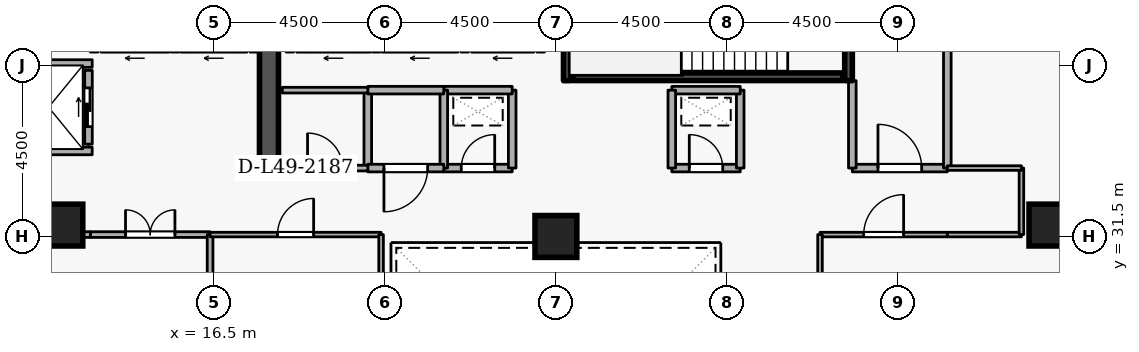
"""IFC4 building model, lengths in metres.
Left out: names, types, materials, properties, quantities, classifications, styles, units other than length and angle.
Written with IfcOpenShell. Run it as: python <this file> out.ifc"""

import sys

from ifc_helpers import new_model, si_unit, direction, frame, frame_2d, origin, origin_2d, place, context, subcontext, project, spatial, rectangle, extrude, element, fill, save


model = new_model("IFC4")
c1 = context("Model", 3, precision=1e-05, world=origin(), true_north=direction((0.0, 1.0)))
c2 = subcontext(c1, "Body", "Model", "MODEL_VIEW")
j1 = project(units=[si_unit("LENGTHUNIT", "METRE"), si_unit("PLANEANGLEUNIT", "RADIAN")], contexts=[c1])
p1 = place(None, origin())
s1 = spatial("IfcSite", under=j1, at=p1, CompositionType="ELEMENT")
p2 = place(p1, origin())
s2 = spatial("IfcBuilding", under=s1, at=p2, CompositionType="ELEMENT")
p3 = place(p2, frame((0.0, 0.0, 185.7)))
s3 = spatial("IfcBuildingStorey", under=s2, at=p3, CompositionType="ELEMENT", Elevation=185.7)
p4 = place(p3, frame((17.95, 33.1, 0.0), z_axis=(0.0, 0.0, 1.0), x_axis=(0.0, 1.0, 0.0)))
e1 = element("IfcWall", 1, at=p4, inside=s3, PredefinedType="SHEAR", context=c2, shape_type="SweptSolid", body=[
    extrude(rectangle(XDim=5.8, YDim=0.5, at=frame_2d((2.9, 0.0))), origin(), (0.0, 0.0, 1.0), 3.6),
])
for number, where, z_axis, x_axis in (
    (2, (12.5, 31.8, 0.0), (0.0, 0.0, 1.0), (1.0, 0.0, 0.0)),
    (3, (38.5, 31.8, 0.0), (0.0, 0.0, 1.0), (1.0, 0.0, 0.0)),
    (4, (25.5, 31.5, 0.0), (0.0, 0.0, 1.0), (1.0, 0.0, 0.0)),
):
    element("IfcColumn", number, at=place(p3, frame(where, z_axis=z_axis, x_axis=x_axis)), inside=s3, PredefinedType="COLUMN", context=c2, shape_type="SweptSolid", body=[
        extrude(rectangle(XDim=1.1, YDim=1.1, at=origin_2d()), origin(), (0.0, 0.0, 1.0), 3.6),
    ])
p5 = place(p3, frame((24.92, 36.45, 0.0), z_axis=(0.0, 0.0, 1.0), x_axis=(-1.0, 0.0, 0.0)))
e5 = element("IfcWall", 5, at=p5, inside=s3, PredefinedType="STANDARD", context=c2, shape_type="SweptSolid", body=[
    extrude(rectangle(XDim=1.64, YDim=0.2, at=frame_2d((0.82, 0.0))), origin(), (0.0, 0.0, 1.0), 3.34),
])
p6 = place(p5, frame((0.31, 0.0, 0.0)))
e6 = element("IfcOpeningElement", 6, at=p6, cuts=e5, PredefinedType="OPENING", context=c2, shape_type="SweptSolid", body=[
    extrude(rectangle(XDim=1.02, YDim=2.06, at=frame_2d((0.51, 1.03))), frame((0.0, 0.11, 0.0), z_axis=(0.0, -1.0, 0.0), x_axis=(1.0, 0.0, 0.0)), (0.0, 0.0, 1.0), 0.22),
])
p7 = place(p3, frame((22.92, 36.45, 0.0), z_axis=(0.0, 0.0, 1.0), x_axis=(-1.0, 0.0, 0.0)))
e7 = element("IfcWall", 7, at=p7, inside=s3, PredefinedType="STANDARD", context=c2, shape_type="SweptSolid", body=[
    extrude(rectangle(XDim=1.99, YDim=0.2, at=frame_2d((0.995, 0.0))), origin(), (0.0, 0.0, 1.0), 3.34),
])
p8 = place(p7, frame((0.485, 0.0, 0.0)))
e8 = element("IfcOpeningElement", 8, at=p8, cuts=e7, PredefinedType="OPENING", context=c2, shape_type="SweptSolid", body=[
    extrude(rectangle(XDim=1.02, YDim=2.06, at=frame_2d((0.51, 1.03))), frame((0.0, 0.11, 0.0), z_axis=(0.0, -1.0, 0.0), x_axis=(1.0, 0.0, 0.0)), (0.0, 0.0, 1.0), 0.22),
])
p9 = place(p3, frame((20.62, 36.45, 0.0), z_axis=(0.0, 0.0, 1.0), x_axis=(-1.0, 0.0, 0.0)))
e9 = element("IfcWall", 9, at=p9, inside=s3, PredefinedType="STANDARD", context=c2, shape_type="SweptSolid", body=[
    extrude(rectangle(XDim=1.94, YDim=0.2, at=frame_2d((0.97, 0.0))), origin(), (0.0, 0.0, 1.0), 3.34),
])
p10 = place(p9, frame((0.46, 0.0, 0.0)))
e10 = element("IfcOpeningElement", 10, at=p10, cuts=e9, PredefinedType="OPENING", context=c2, shape_type="SweptSolid", body=[
    extrude(rectangle(XDim=1.02, YDim=2.06, at=frame_2d((0.51, 1.03))), frame((0.0, 0.11, 0.0), z_axis=(0.0, -1.0, 0.0), x_axis=(1.0, 0.0, 0.0)), (0.0, 0.0, 1.0), 0.22),
])
p11 = place(p3, frame((17.37, 36.45, 0.0), z_axis=(0.0, 0.0, 1.0), x_axis=(-1.0, 0.0, 0.0)))
e11 = element("IfcWall", 11, at=p11, inside=s3, PredefinedType="STANDARD", context=c2, shape_type="SweptSolid", body=[
    extrude(rectangle(XDim=1.74, YDim=0.2, at=frame_2d((0.87, 0.0))), origin(), (0.0, 0.0, 1.0), 3.34),
])
p12 = place(p11, frame((0.36, 0.0, 0.0)))
e12 = element("IfcOpeningElement", 12, at=p12, cuts=e11, PredefinedType="OPENING", context=c2, shape_type="SweptSolid", body=[
    extrude(rectangle(XDim=1.02, YDim=2.06, at=frame_2d((0.51, 1.03))), frame((0.0, 0.11, 0.0), z_axis=(0.0, -1.0, 0.0), x_axis=(1.0, 0.0, 0.0)), (0.0, 0.0, 1.0), 0.22),
])
p13 = place(p3, frame((15.32, 36.45, 0.0), z_axis=(0.0, 0.0, 1.0), x_axis=(-1.0, 0.0, 0.0)))
e13 = element("IfcWall", 13, at=p13, inside=s3, PredefinedType="STANDARD", context=c2, shape_type="SweptSolid", body=[
    extrude(rectangle(XDim=1.79, YDim=0.2, at=frame_2d((0.895, 0.0))), origin(), (0.0, 0.0, 1.0), 3.34),
])
p14 = place(p13, frame((0.385, 0.0, 0.0)))
e14 = element("IfcOpeningElement", 14, at=p14, cuts=e13, PredefinedType="OPENING", context=c2, shape_type="SweptSolid", body=[
    extrude(rectangle(XDim=1.02, YDim=2.06, at=frame_2d((0.51, 1.03))), frame((0.0, 0.11, 0.0), z_axis=(0.0, -1.0, 0.0), x_axis=(1.0, 0.0, 0.0)), (0.0, 0.0, 1.0), 0.22),
])
p15 = place(p3, frame((13.2, 33.93, 0.0), z_axis=(0.0, 0.0, 1.0), x_axis=(0.0, 1.0, 0.0)))
e15 = element("IfcWall", 15, at=p15, inside=s3, PredefinedType="STANDARD", context=c2, shape_type="SweptSolid", body=[
    extrude(rectangle(XDim=1.94, YDim=0.2, at=frame_2d((0.97, 0.0))), origin(), (0.0, 0.0, 1.0), 3.34),
])
p16 = place(p15, frame((0.46, 0.0, 0.0)))
e16 = element("IfcOpeningElement", 16, at=p16, cuts=e15, PredefinedType="OPENING", context=c2, shape_type="SweptSolid", body=[
    extrude(rectangle(XDim=1.02, YDim=2.06, at=frame_2d((0.51, 1.03))), frame((0.0, 0.11, 0.0), z_axis=(0.0, -1.0, 0.0), x_axis=(1.0, 0.0, 0.0)), (0.0, 0.0, 1.0), 0.22),
])
for number, where, z_axis, x_axis in (
    (17, (11.002, 36.05, 0.0), (0.0, 0.0, 1.0), (1.0, 0.0, 0.0)),
    (18, (11.002, 33.75, 0.0), (0.0, 0.0, 1.0), (1.0, 0.0, 0.0)),
):
    element("IfcWall", number, at=place(p3, frame(where, z_axis=z_axis, x_axis=x_axis)), inside=s3, PredefinedType="STANDARD", context=c2, shape_type="SweptSolid", body=[
        extrude(rectangle(XDim=2.296, YDim=0.2, at=frame_2d((1.148, 0.0))), origin(), (0.0, 0.0, 1.0), 3.34),
    ])
p17 = place(p3, frame((33.2, 38.95, 0.0), z_axis=(0.0, 0.0, 1.0), x_axis=(0.0, -1.0, 0.0)))
e19 = element("IfcWall", 19, at=p17, inside=s3, PredefinedType="SHEAR", context=c2, shape_type="SweptSolid", body=[
    extrude(rectangle(XDim=3.35, YDim=0.2, at=frame_2d((1.675, 0.0))), origin(), (0.0, 0.0, 1.0), 3.6),
])
p18 = place(p17, frame((1.125, 0.0, 0.0)))
e20 = element("IfcOpeningElement", 20, at=p18, cuts=e19, PredefinedType="OPENING", context=c2, shape_type="SweptSolid", body=[
    extrude(rectangle(XDim=1.1, YDim=2.1, at=frame_2d((0.55, 1.05))), frame((0.0, 0.11, 0.0), z_axis=(0.0, -1.0, 0.0), x_axis=(1.0, 0.0, 0.0)), (0.0, 0.0, 1.0), 0.22),
])
p19 = place(p3, frame((25.8, 35.6, 0.0), z_axis=(0.0, 0.0, 1.0), x_axis=(0.0, 1.0, 0.0)))
e21 = element("IfcWall", 21, at=p19, inside=s3, PredefinedType="SHEAR", context=c2, shape_type="SweptSolid", body=[
    extrude(rectangle(XDim=3.35, YDim=0.2, at=frame_2d((1.675, 0.0))), origin(), (0.0, 0.0, 1.0), 3.6),
])
p20 = place(p3, frame((25.95, 35.703, 0.0), z_axis=(0.0, 0.0, 1.0), x_axis=(1.0, 0.0, 0.0)))
e22 = element("IfcWall", 22, at=p20, inside=s3, PredefinedType="SHEAR", context=c2, shape_type="SweptSolid", body=[
    extrude(rectangle(XDim=7.1, YDim=0.2, at=frame_2d((3.55, 0.0))), origin(), (0.0, 0.0, 1.0), 3.6),
])
p21 = place(p3, frame((33.3, 33.3, 0.0), z_axis=(0.0, 0.0, 1.0), x_axis=(1.0, 0.0, 0.0)))
e23 = element("IfcWall", 23, at=p21, inside=s3, PredefinedType="STANDARD", context=c2, shape_type="SweptSolid", body=[
    extrude(rectangle(XDim=2.5, YDim=0.2, at=frame_2d((1.25, 0.0))), origin(), (0.0, 0.0, 1.0), 3.34),
])
p22 = place(p21, frame((0.675, 0.0, 0.0)))
e24 = element("IfcOpeningElement", 24, at=p22, cuts=e23, PredefinedType="OPENING", context=c2, shape_type="SweptSolid", body=[
    extrude(rectangle(XDim=1.15, YDim=2.1, at=frame_2d((0.575, 1.05))), frame((0.0, 0.11, 0.0), z_axis=(0.0, -1.0, 0.0), x_axis=(1.0, 0.0, 0.0)), (0.0, 0.0, 1.0), 0.22),
])
p23 = place(p3, frame((35.8, 33.3, 0.0), z_axis=(0.0, 0.0, 1.0), x_axis=(0.0, 1.0, 0.0)))
e25 = element("IfcWall", 25, at=p23, inside=s3, PredefinedType="STANDARD", context=c2, shape_type="SweptSolid", body=[
    extrude(rectangle(XDim=5.7, YDim=0.2, at=frame_2d((2.85, 0.0))), origin(), (0.0, 0.0, 1.0), 3.34),
])
p24 = place(p3, frame((33.3, 35.6, 0.0), z_axis=(0.0, 0.0, 1.0), x_axis=(0.0, -1.0, 0.0)))
e26 = element("IfcWall", 26, at=p24, inside=s3, PredefinedType="STANDARD", context=c2, shape_type="SweptSolid", body=[
    extrude(rectangle(XDim=2.3, YDim=0.2, at=frame_2d((1.15, 0.0))), origin(), (0.0, 0.0, 1.0), 2.545),
])
p25 = place(p3, frame((22.55, 33.3, 0.0), z_axis=(0.0, 0.0, 1.0), x_axis=(1.0, 0.0, 0.0)))
e27 = element("IfcWall", 27, at=p25, inside=s3, PredefinedType="STANDARD", context=c2, shape_type="SweptSolid", body=[
    extrude(rectangle(XDim=1.8, YDim=0.2, at=frame_2d((0.9, 0.0))), origin(), (0.0, 0.0, 1.0), 3.34),
])
p26 = place(p25, frame((0.46, 0.0, 0.0)))
e28 = element("IfcOpeningElement", 28, at=p26, cuts=e27, PredefinedType="OPENING", context=c2, shape_type="SweptSolid", body=[
    extrude(rectangle(XDim=0.88, YDim=2.04, at=frame_2d((0.44, 1.02))), frame((0.0, 0.11, 0.0), z_axis=(0.0, -1.0, 0.0), x_axis=(1.0, 0.0, 0.0)), (0.0, 0.0, 1.0), 0.22),
])
p27 = place(p3, frame((24.35, 33.3, 0.0), z_axis=(0.0, 0.0, 1.0), x_axis=(0.0, 1.0, 0.0)))
e29 = element("IfcWall", 29, at=p27, inside=s3, PredefinedType="STANDARD", context=c2, shape_type="SweptSolid", body=[
    extrude(rectangle(XDim=2.05, YDim=0.2, at=frame_2d((1.025, 0.0))), origin(), (0.0, 0.0, 1.0), 3.34),
])
p28 = place(p3, frame((24.35, 35.35, 0.0), z_axis=(0.0, 0.0, 1.0), x_axis=(-1.0, 0.0, 0.0)))
e30 = element("IfcWall", 30, at=p28, inside=s3, PredefinedType="STANDARD", context=c2, shape_type="SweptSolid", body=[
    extrude(rectangle(XDim=1.8, YDim=0.2, at=frame_2d((0.9, 0.0))), origin(), (0.0, 0.0, 1.0), 3.34),
])
p29 = place(p3, frame((22.55, 35.35, 0.0), z_axis=(0.0, 0.0, 1.0), x_axis=(0.0, -1.0, 0.0)))
e31 = element("IfcWall", 31, at=p29, inside=s3, PredefinedType="STANDARD", context=c2, shape_type="SweptSolid", body=[
    extrude(rectangle(XDim=2.05, YDim=0.2, at=frame_2d((1.025, 0.0))), origin(), (0.0, 0.0, 1.0), 3.34),
])
p30 = place(p3, frame((28.55, 33.3, 0.0), z_axis=(0.0, 0.0, 1.0), x_axis=(1.0, 0.0, 0.0)))
e32 = element("IfcWall", 32, at=p30, inside=s3, PredefinedType="STANDARD", context=c2, shape_type="SweptSolid", body=[
    extrude(rectangle(XDim=1.8, YDim=0.2, at=frame_2d((0.9, 0.0))), origin(), (0.0, 0.0, 1.0), 3.34),
])
p31 = place(p30, frame((0.46, 0.0, 0.0)))
e33 = element("IfcOpeningElement", 33, at=p31, cuts=e32, PredefinedType="OPENING", context=c2, shape_type="SweptSolid", body=[
    extrude(rectangle(XDim=0.88, YDim=2.04, at=frame_2d((0.44, 1.02))), frame((0.0, 0.11, 0.0), z_axis=(0.0, -1.0, 0.0), x_axis=(1.0, 0.0, 0.0)), (0.0, 0.0, 1.0), 0.22),
])
p32 = place(p3, frame((30.35, 33.3, 0.0), z_axis=(0.0, 0.0, 1.0), x_axis=(0.0, 1.0, 0.0)))
e34 = element("IfcWall", 34, at=p32, inside=s3, PredefinedType="STANDARD", context=c2, shape_type="SweptSolid", body=[
    extrude(rectangle(XDim=2.05, YDim=0.2, at=frame_2d((1.025, 0.0))), origin(), (0.0, 0.0, 1.0), 3.34),
])
p33 = place(p3, frame((30.35, 35.35, 0.0), z_axis=(0.0, 0.0, 1.0), x_axis=(-1.0, 0.0, 0.0)))
e35 = element("IfcWall", 35, at=p33, inside=s3, PredefinedType="STANDARD", context=c2, shape_type="SweptSolid", body=[
    extrude(rectangle(XDim=1.8, YDim=0.2, at=frame_2d((0.9, 0.0))), origin(), (0.0, 0.0, 1.0), 3.34),
])
for number, where, z_axis, x_axis in (
    (36, (28.55, 35.35, 0.0), (0.0, 0.0, 1.0), (0.0, -1.0, 0.0)),
    (37, (20.55, 33.3, 0.0), (0.0, 0.0, 1.0), (0.0, 1.0, 0.0)),
):
    element("IfcWall", number, at=place(p3, frame(where, z_axis=z_axis, x_axis=x_axis)), inside=s3, PredefinedType="STANDARD", context=c2, shape_type="SweptSolid", body=[
        extrude(rectangle(XDim=2.05, YDim=0.2, at=frame_2d((1.025, 0.0))), origin(), (0.0, 0.0, 1.0), 3.34),
    ])
p34 = place(p3, frame((20.55, 35.35, 0.0), z_axis=(0.0, 0.0, 1.0), x_axis=(1.0, 0.0, 0.0)))
e38 = element("IfcWall", 38, at=p34, inside=s3, PredefinedType="STANDARD", context=c2, shape_type="SweptSolid", body=[
    extrude(rectangle(XDim=2.0, YDim=0.2, at=frame_2d((1.0, 0.0))), origin(), (0.0, 0.0, 1.0), 3.34),
])
p35 = place(p3, frame((22.55, 33.3, 0.0), z_axis=(0.0, 0.0, 1.0), x_axis=(-1.0, 0.0, 0.0)))
e39 = element("IfcWall", 39, at=p35, inside=s3, PredefinedType="STANDARD", context=c2, shape_type="SweptSolid", body=[
    extrude(rectangle(XDim=2.0, YDim=0.2, at=frame_2d((1.0, 0.0))), origin(), (0.0, 0.0, 1.0), 3.34),
])
p36 = place(p35, frame((0.425, 0.0, 0.0)))
e40 = element("IfcOpeningElement", 40, at=p36, cuts=e39, PredefinedType="OPENING", context=c2, shape_type="SweptSolid", body=[
    extrude(rectangle(XDim=1.15, YDim=2.1, at=frame_2d((0.575, 1.05))), frame((0.0, 0.11, 0.0), z_axis=(0.0, -1.0, 0.0), x_axis=(1.0, 0.0, 0.0)), (0.0, 0.0, 1.0), 0.22),
])
p37 = place(p3, frame((18.3, 33.3, 0.0), z_axis=(0.0, 0.0, 1.0), x_axis=(1.0, 0.0, 0.0)))
e41 = element("IfcWall", 41, at=p37, inside=s3, PredefinedType="PARTITIONING", context=c2, shape_type="SweptSolid", body=[
    extrude(rectangle(XDim=2.25, YDim=0.15, at=frame_2d((1.125, 0.0))), origin(), (0.0, 0.0, 1.0), 3.34),
])
p38 = place(p37, frame((0.665, 0.0, 0.0)))
e42 = element("IfcOpeningElement", 42, at=p38, cuts=e41, PredefinedType="OPENING", context=c2, shape_type="SweptSolid", body=[
    extrude(rectangle(XDim=0.92, YDim=2.08, at=frame_2d((0.46, 1.04))), frame((0.0, 0.085, 0.0), z_axis=(0.0, -1.0, 0.0), x_axis=(1.0, 0.0, 0.0)), (0.0, 0.0, 1.0), 0.17),
])
p39 = place(p3, frame((20.55, 35.35, 0.0), z_axis=(0.0, 0.0, 1.0), x_axis=(-1.0, 0.0, 0.0)))
e43 = element("IfcWall", 43, at=p39, inside=s3, PredefinedType="PARTITIONING", context=c2, shape_type="SweptSolid", body=[
    extrude(rectangle(XDim=2.25, YDim=0.15, at=frame_2d((1.125, 0.0))), origin(), (0.0, 0.0, 1.0), 3.34),
])
p40 = place(p3, frame((13.25, 31.55, 0.0), z_axis=(0.0, 0.0, 1.0), x_axis=(1.0, 0.0, 0.0)))
e44 = element("IfcWall", 44, at=p40, inside=s3, PredefinedType="PARTITIONING", context=c2, shape_type="SweptSolid", body=[
    extrude(rectangle(XDim=3.15, YDim=0.15, at=frame_2d((1.575, 0.0))), origin(), (0.0, 0.0, 1.0), 3.34),
])
p41 = place(p40, frame((0.925, 0.0, 0.0)))
e45 = element("IfcOpeningElement", 45, at=p41, cuts=e44, PredefinedType="OPENING", context=c2, shape_type="SweptSolid", body=[
    extrude(rectangle(XDim=1.3, YDim=2.12, at=frame_2d((0.65, 1.06))), frame((0.0, 0.085, 0.0), z_axis=(0.0, -1.0, 0.0), x_axis=(1.0, 0.0, 0.0)), (0.0, 0.0, 1.0), 0.17),
])
p42 = place(p3, frame((16.4, 31.55, 0.0), z_axis=(0.0, 0.0, 1.0), x_axis=(0.0, -1.0, 0.0)))
e46 = element("IfcWall", 46, at=p42, inside=s3, PredefinedType="PARTITIONING", context=c2, shape_type="SweptSolid", body=[
    extrude(rectangle(XDim=4.55, YDim=0.15, at=frame_2d((2.275, 0.0))), origin(), (0.0, 0.0, 1.0), 3.34),
])
p43 = place(p3, frame((10.9, 31.55, 0.0), z_axis=(0.0, 0.0, 1.0), x_axis=(1.0, 0.0, 0.0)))
e47 = element("IfcWall", 47, at=p43, inside=s3, PredefinedType="PARTITIONING", context=c2, shape_type="SweptSolid", body=[
    extrude(rectangle(XDim=2.35, YDim=0.15, at=frame_2d((1.175, 0.0))), origin(), (0.0, 0.0, 1.0), 3.34),
])
p44 = place(p3, frame((16.4, 31.55, 0.0), z_axis=(0.0, 0.0, 1.0), x_axis=(1.0, 0.0, 0.0)))
e48 = element("IfcWall", 48, at=p44, inside=s3, PredefinedType="PARTITIONING", context=c2, shape_type="SweptSolid", body=[
    extrude(rectangle(XDim=4.5, YDim=0.12, at=frame_2d((2.25, 0.0))), origin(), (0.0, 0.0, 1.0), 3.34),
])
p45 = place(p44, frame((1.775, 0.0, 0.0)))
e49 = element("IfcOpeningElement", 49, at=p45, cuts=e48, PredefinedType="OPENING", context=c2, shape_type="SweptSolid", body=[
    extrude(rectangle(XDim=0.95, YDim=2.1, at=frame_2d((0.475, 1.05))), frame((0.0, 0.07, 0.0), z_axis=(0.0, -1.0, 0.0), x_axis=(1.0, 0.0, 0.0)), (0.0, 0.0, 1.0), 0.14),
])
p46 = place(p3, frame((20.9, 31.55, 0.0), z_axis=(0.0, 0.0, 1.0), x_axis=(0.0, -1.0, 0.0)))
e50 = element("IfcWall", 50, at=p46, inside=s3, PredefinedType="PARTITIONING", context=c2, shape_type="SweptSolid", body=[
    extrude(rectangle(XDim=9.1, YDim=0.12, at=frame_2d((4.55, 0.0))), origin(), (0.0, 0.0, 1.0), 3.34),
])
p47 = place(p3, frame((32.45, 31.55, 0.0), z_axis=(0.0, 0.0, 1.0), x_axis=(1.0, 0.0, 0.0)))
e51 = element("IfcWall", 51, at=p47, inside=s3, PredefinedType="PARTITIONING", context=c2, shape_type="SweptSolid", body=[
    extrude(rectangle(XDim=3.35, YDim=0.12, at=frame_2d((1.675, 0.0))), origin(), (0.0, 0.0, 1.0), 3.34),
])
p48 = place(p47, frame((1.15, 0.0, 0.0)))
e52 = element("IfcOpeningElement", 52, at=p48, cuts=e51, PredefinedType="OPENING", context=c2, shape_type="SweptSolid", body=[
    extrude(rectangle(XDim=1.05, YDim=2.1, at=frame_2d((0.525, 1.05))), frame((0.0, 0.07, 0.0), z_axis=(0.0, -1.0, 0.0), x_axis=(1.0, 0.0, 0.0)), (0.0, 0.0, 1.0), 0.14),
])
p49 = place(p3, frame((35.8, 31.55, 0.0), z_axis=(0.0, 0.0, 1.0), x_axis=(1.0, 0.0, 0.0)))
e53 = element("IfcWall", 53, at=p49, inside=s3, PredefinedType="PARTITIONING", context=c2, shape_type="SweptSolid", body=[
    extrude(rectangle(XDim=1.95, YDim=0.12, at=frame_2d((0.975, 0.0))), origin(), (0.0, 0.0, 1.0), 3.34),
])
p50 = place(p3, frame((37.75, 31.55, 0.0), z_axis=(0.0, 0.0, 1.0), x_axis=(0.0, 1.0, 0.0)))
e54 = element("IfcWall", 54, at=p50, inside=s3, PredefinedType="PARTITIONING", context=c2, shape_type="SweptSolid", body=[
    extrude(rectangle(XDim=1.75, YDim=0.12, at=frame_2d((0.875, 0.0))), origin(), (0.0, 0.0, 1.0), 3.34),
])
p51 = place(p3, frame((37.75, 33.3, 0.0), z_axis=(0.0, 0.0, 1.0), x_axis=(-1.0, 0.0, 0.0)))
e55 = element("IfcWall", 55, at=p51, inside=s3, PredefinedType="PARTITIONING", context=c2, shape_type="SweptSolid", body=[
    extrude(rectangle(XDim=1.95, YDim=0.12, at=frame_2d((0.975, 0.0))), origin(), (0.0, 0.0, 1.0), 3.34),
])
p52 = place(p3, frame((32.45, 29.25, 0.0), z_axis=(0.0, 0.0, 1.0), x_axis=(0.0, 1.0, 0.0)))
e56 = element("IfcWall", 56, at=p52, inside=s3, PredefinedType="PARTITIONING", context=c2, shape_type="SweptSolid", body=[
    extrude(rectangle(XDim=2.3, YDim=0.12, at=frame_2d((1.15, 0.0))), origin(), (0.0, 0.0, 1.0), 3.34),
])
p53 = place(p16, origin())
e57 = element("IfcDoor", 57, at=p53, inside=s3, OperationType="SLIDING_TO_LEFT", PredefinedType="DOOR", context=c2, shape_type="SweptSolid", body=[
    extrude(rectangle(XDim=1.02, YDim=2.06, at=frame_2d((0.51, 1.03))), frame((0.0, 0.025, 0.0), z_axis=(0.0, -1.0, 0.0), x_axis=(1.0, 0.0, 0.0)), (0.0, 0.0, 1.0), 0.05),
])
fill(e16, e57)
p54 = place(p22, origin())
e58 = element("IfcDoor", 58, at=p54, inside=s3, OperationType="SINGLE_SWING_LEFT", PredefinedType="DOOR", context=c2, shape_type="SweptSolid", body=[
    extrude(rectangle(XDim=1.15, YDim=2.1, at=frame_2d((0.575, 1.05))), frame((0.0, 0.025, 0.0), z_axis=(0.0, -1.0, 0.0), x_axis=(1.0, 0.0, 0.0)), (0.0, 0.0, 1.0), 0.05),
])
fill(e24, e58)
p55 = place(p26, origin())
e59 = element("IfcDoor", 59, at=p55, inside=s3, OperationType="SINGLE_SWING_RIGHT", PredefinedType="DOOR", context=c2, shape_type="SweptSolid", body=[
    extrude(rectangle(XDim=0.88, YDim=2.04, at=frame_2d((0.44, 1.02))), frame((0.0, 0.025, 0.0), z_axis=(0.0, -1.0, 0.0), x_axis=(1.0, 0.0, 0.0)), (0.0, 0.0, 1.0), 0.05),
])
fill(e28, e59)
p56 = place(p31, origin())
e60 = element("IfcDoor", 60, at=p56, inside=s3, OperationType="SINGLE_SWING_LEFT", PredefinedType="DOOR", context=c2, shape_type="SweptSolid", body=[
    extrude(rectangle(XDim=0.88, YDim=2.04, at=frame_2d((0.44, 1.02))), frame((0.0, 0.025, 0.0), z_axis=(0.0, -1.0, 0.0), x_axis=(1.0, 0.0, 0.0)), (0.0, 0.0, 1.0), 0.05),
])
fill(e33, e60)
p57 = place(p38, origin())
e61 = element("IfcDoor", 61, at=p57, inside=s3, OperationType="SINGLE_SWING_LEFT", PredefinedType="DOOR", context=c2, shape_type="SweptSolid", body=[
    extrude(rectangle(XDim=0.92, YDim=2.08, at=frame_2d((0.46, 1.04))), frame((0.0, 0.025, 0.0), z_axis=(0.0, -1.0, 0.0), x_axis=(1.0, 0.0, 0.0)), (0.0, 0.0, 1.0), 0.05),
])
fill(e42, e61)
p58 = place(p36, origin())
e62 = element("IfcDoor", 62, at=p58, inside=s3, OperationType="SINGLE_SWING_RIGHT", PredefinedType="DOOR", context=c2, shape_type="SweptSolid", body=[
    extrude(rectangle(XDim=1.15, YDim=2.1, at=frame_2d((0.575, 1.05))), frame((0.0, 0.025, 0.0), z_axis=(0.0, -1.0, 0.0), x_axis=(1.0, 0.0, 0.0)), (0.0, 0.0, 1.0), 0.05),
])
fill(e40, e62)
p59 = place(p41, origin())
e63 = element("IfcDoor", 63, at=p59, inside=s3, OperationType="DOUBLE_DOOR_SINGLE_SWING", PredefinedType="DOOR", context=c2, shape_type="SweptSolid", body=[
    extrude(rectangle(XDim=1.3, YDim=2.12, at=frame_2d((0.65, 1.06))), frame((0.0, 0.025, 0.0), z_axis=(0.0, -1.0, 0.0), x_axis=(1.0, 0.0, 0.0)), (0.0, 0.0, 1.0), 0.05),
])
fill(e45, e63)
p60 = place(p45, origin())
e64 = element("IfcDoor", 64, at=p60, inside=s3, OperationType="SINGLE_SWING_RIGHT", PredefinedType="DOOR", context=c2, shape_type="SweptSolid", body=[
    extrude(rectangle(XDim=0.95, YDim=2.1, at=frame_2d((0.475, 1.05))), frame((0.0, 0.025, 0.0), z_axis=(0.0, -1.0, 0.0), x_axis=(1.0, 0.0, 0.0)), (0.0, 0.0, 1.0), 0.05),
])
fill(e49, e64)
p61 = place(p48, origin())
e65 = element("IfcDoor", 65, at=p61, inside=s3, OperationType="SINGLE_SWING_RIGHT", PredefinedType="DOOR", context=c2, shape_type="SweptSolid", body=[
    extrude(rectangle(XDim=1.05, YDim=2.1, at=frame_2d((0.525, 1.05))), frame((0.0, 0.025, 0.0), z_axis=(0.0, -1.0, 0.0), x_axis=(1.0, 0.0, 0.0)), (0.0, 0.0, 1.0), 0.05),
])
fill(e52, e65)
save(model, sys.argv[1])
